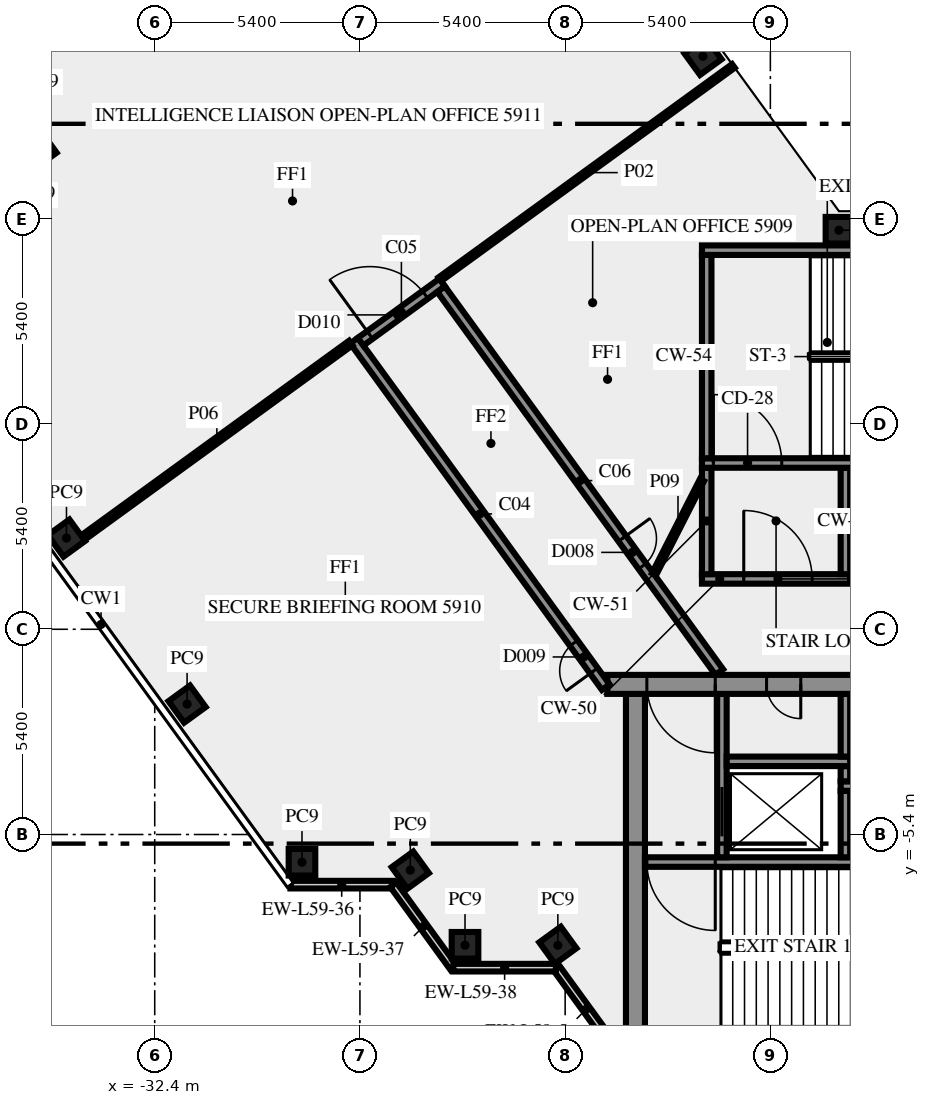
"""IFC4 building model, lengths in metres.
Left out: names, types, materials, properties, quantities, classifications, styles, units other than length and angle.
Written with IfcOpenShell. Run it as: python <this file> out.ifc"""

import sys

from ifc_helpers import new_model, si_unit, direction, frame, frame_2d, origin, origin_2d, place, context, subcontext, project, spatial, rectangle, extrude, element, fill, save


model = new_model("IFC4")
c1 = context("Model", 3, precision=1e-05, world=origin(), true_north=direction((0.0, 1.0)))
c2 = subcontext(c1, "Body", "Model", "MODEL_VIEW")
j1 = project(units=[si_unit("LENGTHUNIT", "METRE"), si_unit("PLANEANGLEUNIT", "RADIAN")], contexts=[c1])
p1 = place(None, origin())
s1 = spatial("IfcSite", under=j1, at=p1, CompositionType="ELEMENT")
p2 = place(p1, origin())
s2 = spatial("IfcBuilding", under=s1, at=p2, CompositionType="ELEMENT")
p3 = place(p2, frame((0.0, 0.0, 253.0)))
s3 = spatial("IfcBuildingStorey", under=s2, at=p3, CompositionType="ELEMENT", Elevation=253.0)
for number, where, z_axis, x_axis in (
    (1, (-17.974, 15.075, 0.0), (0.0, 0.0, 1.0), (-0.588, 0.809, 0.0)),
    (2, (-35.471, 12.616, 0.0), (0.0, 0.0, 1.0), (-0.809, -0.588, 0.0)),
    (3, (-34.722, 2.4, 0.0), (0.0, 0.0, 1.0), (0.588, -0.809, 0.0)),
    (4, (-31.548, -1.969, 0.0), (0.0, 0.0, 1.0), (0.588, -0.809, 0.0)),
    (5, (-28.525, -6.13, 0.0), (0.0, 0.0, 1.0), (1.0, 0.0, 0.0)),
    (6, (-25.674, -6.337, 0.0), (0.0, 0.0, 1.0), (0.588, -0.809, 0.0)),
    (7, (-24.235, -8.315, 0.0), (0.0, 0.0, 1.0), (1.0, 0.0, 0.0)),
    (8, (-21.792, -8.315, 0.0), (0.0, 0.0, 1.0), (0.588, -0.809, 0.0)),
    (9, (-14.395, 10.5, 0.0), (0.0, 0.0, 1.0), (-1.0, 0.0, 0.0)),
):
    element("IfcColumn", number, at=place(p3, frame(where, z_axis=z_axis, x_axis=x_axis)), inside=s3, PredefinedType="COLUMN", context=c2, shape_type="SweptSolid", body=[
        extrude(rectangle(XDim=0.7, YDim=0.7, at=origin_2d()), origin(), (0.0, 0.0, 1.0), 3.65),
    ])
p4 = place(p3, frame((-21.833, -8.909, 0.0), z_axis=(0.0, 0.0, 1.0), x_axis=(0.587766567315, -0.809030569476, 0.0)))
e10 = element("IfcWall", 10, at=p4, inside=s3, PredefinedType="SOLIDWALL", context=c2, shape_type="SweptSolid", body=[
    extrude(rectangle(XDim=2.688, YDim=0.2, at=frame_2d((1.344, 0.0))), origin(), (0.0, 0.0, 1.0), 3.65),
])
p5 = place(p3, frame((-28.83, -6.719, 0.0), z_axis=(0.0, 0.0, 1.0), x_axis=(1.0, 0.0, 0.0)))
e11 = element("IfcWall", 11, at=p5, inside=s3, PredefinedType="SOLIDWALL", context=c2, shape_type="SweptSolid", body=[
    extrude(rectangle(XDim=2.7, YDim=0.2, at=frame_2d((1.35, 0.0))), origin(), (0.0, 0.0, 1.0), 3.65),
])
p6 = place(p3, frame((-26.12, -6.724, 0.0), z_axis=(0.0, 0.0, 1.0), x_axis=(0.587720002413, -0.809064397168, 0.0)))
e12 = element("IfcWall", 12, at=p6, inside=s3, PredefinedType="SOLIDWALL", context=c2, shape_type="SweptSolid", body=[
    extrude(rectangle(XDim=2.7, YDim=0.2, at=frame_2d((1.35, 0.0))), origin(), (0.0, 0.0, 1.0), 3.65),
])
p7 = place(p3, frame((-24.543, -8.904, 0.0), z_axis=(0.0, 0.0, 1.0), x_axis=(1.0, 0.0, 0.0)))
e13 = element("IfcWall", 13, at=p7, inside=s3, PredefinedType="SOLIDWALL", context=c2, shape_type="SweptSolid", body=[
    extrude(rectangle(XDim=2.7, YDim=0.2, at=frame_2d((1.35, 0.0))), origin(), (0.0, 0.0, 1.0), 3.65),
])
p8 = place(p3, frame((-19.75, -10.5, 0.0), z_axis=(0.0, 0.0, 1.0), x_axis=(0.0, 1.0, 0.0)))
e14 = element("IfcWall", 14, at=p8, inside=s3, PredefinedType="SHEAR", context=c2, shape_type="SweptSolid", body=[
    extrude(rectangle(XDim=8.8, YDim=0.5, at=frame_2d((4.4, 0.0))), origin(), (0.0, 0.0, 1.0), 3.65),
])
p9 = place(p3, frame((-11.45, -6.125, 0.0), z_axis=(0.0, 0.0, 1.0), x_axis=(-1.0, 0.0, 0.0)))
e15 = element("IfcWall", 15, at=p9, inside=s3, PredefinedType="SHEAR", context=c2, shape_type="SweptSolid", body=[
    extrude(rectangle(XDim=8.05, YDim=0.25, at=frame_2d((4.025, 0.0))), origin(), (0.0, 0.0, 1.0), 3.65),
])
p10 = place(p9, frame((6.2, 0.0, 0.0)))
e16 = element("IfcOpeningElement", 16, at=p10, cuts=e15, PredefinedType="OPENING", context=c2, shape_type="SweptSolid", body=[
    extrude(rectangle(XDim=1.8, YDim=2.1, at=frame_2d((0.9, 1.05))), frame((0.0, 0.135, 0.0), z_axis=(0.0, -1.0, 0.0), x_axis=(1.0, 0.0, 0.0)), (0.0, 0.0, 1.0), 0.27),
])
p11 = place(p3, frame((-17.475, -6.0, 0.0), z_axis=(0.0, 0.0, 1.0), x_axis=(0.0, 1.0, 0.0)))
e17 = element("IfcWall", 17, at=p11, inside=s3, PredefinedType="SHEAR", context=c2, shape_type="SweptSolid", body=[
    extrude(rectangle(XDim=4.3, YDim=0.25, at=frame_2d((2.15, 0.0))), origin(), (0.0, 0.0, 1.0), 3.65),
])
p12 = place(p11, frame((0.55, 0.0, 0.0)))
e18 = element("IfcOpeningElement", 18, at=p12, cuts=e17, PredefinedType="OPENING", context=c2, shape_type="SweptSolid", body=[
    extrude(rectangle(XDim=1.3, YDim=2.1, at=frame_2d((0.65, 1.05))), frame((0.0, 0.135, 0.0), z_axis=(0.0, -1.0, 0.0), x_axis=(1.0, 0.0, 0.0)), (0.0, 0.0, 1.0), 0.27),
])
p13 = place(p3, frame((-14.225, -6.0, 0.0), z_axis=(0.0, 0.0, 1.0), x_axis=(0.0, 1.0, 0.0)))
e19 = element("IfcWall", 19, at=p13, inside=s3, PredefinedType="SHEAR", context=c2, shape_type="SweptSolid", body=[
    extrude(rectangle(XDim=1.75, YDim=0.25, at=frame_2d((0.875, 0.0))), origin(), (0.0, 0.0, 1.0), 3.65),
])
p14 = place(p3, frame((-14.35, -4.125, 0.0), z_axis=(0.0, 0.0, 1.0), x_axis=(1.0, 0.0, 0.0)))
e20 = element("IfcWall", 20, at=p14, inside=s3, PredefinedType="SHEAR", context=c2, shape_type="SweptSolid", body=[
    extrude(rectangle(XDim=10.4, YDim=0.25, at=frame_2d((5.2, 0.0))), origin(), (0.0, 0.0, 1.0), 3.65),
])
p15 = place(p14, frame((4.75, 0.0, 0.0)))
e21 = element("IfcOpeningElement", 21, at=p15, cuts=e20, PredefinedType="OPENING", context=c2, shape_type="SweptSolid", body=[
    extrude(rectangle(XDim=1.1, YDim=2.1, at=frame_2d((0.55, 1.05))), frame((0.0, 0.135, 0.0), z_axis=(0.0, -1.0, 0.0), x_axis=(1.0, 0.0, 0.0)), (0.0, 0.0, 1.0), 0.27),
])
p16 = place(p14, frame((7.25, 0.0, 0.0)))
e22 = element("IfcOpeningElement", 22, at=p16, cuts=e20, PredefinedType="OPENING", context=c2, shape_type="SweptSolid", body=[
    extrude(rectangle(XDim=1.1, YDim=2.1, at=frame_2d((0.55, 1.05))), frame((0.0, 0.135, 0.0), z_axis=(0.0, -1.0, 0.0), x_axis=(1.0, 0.0, 0.0)), (0.0, 0.0, 1.0), 0.27),
])
p17 = place(p3, frame((-14.225, -4.0, 0.0), z_axis=(0.0, 0.0, 1.0), x_axis=(0.0, 1.0, 0.0)))
e23 = element("IfcWall", 23, at=p17, inside=s3, PredefinedType="SHEAR", context=c2, shape_type="SweptSolid", body=[
    extrude(rectangle(XDim=0.4, YDim=0.25, at=frame_2d((0.2, 0.0))), origin(), (0.0, 0.0, 1.0), 3.65),
])
p18 = place(p3, frame((-17.35, -3.475, 0.0), z_axis=(0.0, 0.0, 1.0), x_axis=(1.0, 0.0, 0.0)))
e24 = element("IfcWall", 24, at=p18, inside=s3, PredefinedType="SHEAR", context=c2, shape_type="SweptSolid", body=[
    extrude(rectangle(XDim=3.25, YDim=0.25, at=frame_2d((1.625, 0.0))), origin(), (0.0, 0.0, 1.0), 3.65),
])
p19 = place(p3, frame((-14.225, -3.35, 0.0), z_axis=(0.0, 0.0, 1.0), x_axis=(0.0, 1.0, 0.0)))
e25 = element("IfcWall", 25, at=p19, inside=s3, PredefinedType="SHEAR", context=c2, shape_type="SweptSolid", body=[
    extrude(rectangle(XDim=1.65, YDim=0.25, at=frame_2d((0.825, 0.0))), origin(), (0.0, 0.0, 1.0), 3.65),
])
p20 = place(p3, frame((20.49, -1.45, 0.0), z_axis=(0.0, 0.0, 1.0), x_axis=(-1.0, 0.0, 0.0)))
e26 = element("IfcWall", 26, at=p20, inside=s3, PredefinedType="SHEAR", context=c2, shape_type="SweptSolid", body=[
    extrude(rectangle(XDim=40.98, YDim=0.5, at=frame_2d((20.49, 0.0))), origin(), (0.0, 0.0, 1.0), 3.65),
])
p21 = place(p20, frame((38.14, 0.0, 0.0)))
e27 = element("IfcOpeningElement", 27, at=p21, cuts=e26, PredefinedType="OPENING", context=c2, shape_type="SweptSolid", body=[
    extrude(rectangle(XDim=1.8, YDim=2.1, at=frame_2d((0.9, 1.05))), frame((0.0, 0.26, 0.0), z_axis=(0.0, -1.0, 0.0), x_axis=(1.0, 0.0, 0.0)), (0.0, 0.0, 1.0), 0.52),
])
p22 = place(p20, frame((35.89, 0.0, 0.0)))
e28 = element("IfcOpeningElement", 28, at=p22, cuts=e26, PredefinedType="OPENING", context=c2, shape_type="SweptSolid", body=[
    extrude(rectangle(XDim=0.9, YDim=2.1, at=frame_2d((0.45, 1.05))), frame((0.0, 0.26, 0.0), z_axis=(0.0, -1.0, 0.0), x_axis=(1.0, 0.0, 0.0)), (0.0, 0.0, 1.0), 0.52),
])
p23 = place(p20, frame((32.94, 0.0, 0.0)))
e29 = element("IfcOpeningElement", 29, at=p23, cuts=e26, PredefinedType="OPENING", context=c2, shape_type="SweptSolid", body=[
    extrude(rectangle(XDim=0.9, YDim=2.1, at=frame_2d((0.45, 1.05))), frame((0.0, 0.26, 0.0), z_axis=(0.0, -1.0, 0.0), x_axis=(1.0, 0.0, 0.0)), (0.0, 0.0, 1.0), 0.52),
])
p24 = place(p20, frame((31.015, 0.0, 0.0)))
e30 = element("IfcOpeningElement", 30, at=p24, cuts=e26, PredefinedType="OPENING", context=c2, shape_type="SweptSolid", body=[
    extrude(rectangle(XDim=0.8, YDim=2.1, at=frame_2d((0.4, 1.05))), frame((0.0, 0.26, 0.0), z_axis=(0.0, -1.0, 0.0), x_axis=(1.0, 0.0, 0.0)), (0.0, 0.0, 1.0), 0.52),
])
p25 = place(p20, frame((24.765, 0.0, 0.0)))
e31 = element("IfcOpeningElement", 31, at=p25, cuts=e26, PredefinedType="OPENING", context=c2, shape_type="SweptSolid", body=[
    extrude(rectangle(XDim=0.8, YDim=2.1, at=frame_2d((0.4, 1.05))), frame((0.0, 0.26, 0.0), z_axis=(0.0, -1.0, 0.0), x_axis=(1.0, 0.0, 0.0)), (0.0, 0.0, 1.0), 0.52),
])
p26 = place(p20, frame((21.765, 0.0, 0.0)))
e32 = element("IfcOpeningElement", 32, at=p26, cuts=e26, PredefinedType="OPENING", context=c2, shape_type="SweptSolid", body=[
    extrude(rectangle(XDim=2.0, YDim=2.1, at=frame_2d((1.0, 1.05))), frame((0.0, 0.26, 0.0), z_axis=(0.0, -1.0, 0.0), x_axis=(1.0, 0.0, 0.0)), (0.0, 0.0, 1.0), 0.52),
])
p27 = place(p20, frame((14.202, 0.0, 0.0)))
e33 = element("IfcOpeningElement", 33, at=p27, cuts=e26, PredefinedType="OPENING", context=c2, shape_type="SweptSolid", body=[
    extrude(rectangle(XDim=0.9, YDim=2.1, at=frame_2d((0.45, 1.05))), frame((0.0, 0.26, 0.0), z_axis=(0.0, -1.0, 0.0), x_axis=(1.0, 0.0, 0.0)), (0.0, 0.0, 1.0), 0.52),
])
p28 = place(p20, frame((10.478, 0.0, 0.0)))
e34 = element("IfcOpeningElement", 34, at=p28, cuts=e26, PredefinedType="OPENING", context=c2, shape_type="SweptSolid", body=[
    extrude(rectangle(XDim=0.9, YDim=2.1, at=frame_2d((0.45, 1.05))), frame((0.0, 0.26, 0.0), z_axis=(0.0, -1.0, 0.0), x_axis=(1.0, 0.0, 0.0)), (0.0, 0.0, 1.0), 0.52),
])
p29 = place(p20, frame((7.14, 0.0, 0.0)))
e35 = element("IfcOpeningElement", 35, at=p29, cuts=e26, PredefinedType="OPENING", context=c2, shape_type="SweptSolid", body=[
    extrude(rectangle(XDim=0.9, YDim=2.1, at=frame_2d((0.45, 1.05))), frame((0.0, 0.26, 0.0), z_axis=(0.0, -1.0, 0.0), x_axis=(1.0, 0.0, 0.0)), (0.0, 0.0, 1.0), 0.52),
])
p30 = place(p20, frame((5.028, 0.0, 0.0)))
e36 = element("IfcOpeningElement", 36, at=p30, cuts=e26, PredefinedType="OPENING", context=c2, shape_type="SweptSolid", body=[
    extrude(rectangle(XDim=0.8, YDim=2.1, at=frame_2d((0.4, 1.05))), frame((0.0, 0.26, 0.0), z_axis=(0.0, -1.0, 0.0), x_axis=(1.0, 0.0, 0.0)), (0.0, 0.0, 1.0), 0.52),
])
p31 = place(p20, frame((3.452, 0.0, 0.0)))
e37 = element("IfcOpeningElement", 37, at=p31, cuts=e26, PredefinedType="OPENING", context=c2, shape_type="SweptSolid", body=[
    extrude(rectangle(XDim=0.8, YDim=2.1, at=frame_2d((0.4, 1.05))), frame((0.0, 0.26, 0.0), z_axis=(0.0, -1.0, 0.0), x_axis=(1.0, 0.0, 0.0)), (0.0, 0.0, 1.0), 0.52),
])
p32 = place(p20, frame((1.04, 0.0, 0.0)))
e38 = element("IfcOpeningElement", 38, at=p32, cuts=e26, PredefinedType="OPENING", context=c2, shape_type="SweptSolid", body=[
    extrude(rectangle(XDim=1.8, YDim=2.1, at=frame_2d((0.9, 1.05))), frame((0.0, 0.26, 0.0), z_axis=(0.0, -1.0, 0.0), x_axis=(1.0, 0.0, 0.0)), (0.0, 0.0, 1.0), 0.52),
])
p33 = place(p3, frame((-18.0, 1.325, 0.0), z_axis=(0.0, 0.0, 1.0), x_axis=(1.0, 0.0, 0.0)))
e39 = element("IfcWall", 39, at=p33, inside=s3, PredefinedType="SHEAR", context=c2, shape_type="SweptSolid", body=[
    extrude(rectangle(XDim=3.9, YDim=0.25, at=frame_2d((1.95, 0.0))), origin(), (0.0, 0.0, 1.0), 3.65),
])
p34 = place(p33, frame((1.1, 0.0, 0.0)))
e40 = element("IfcOpeningElement", 40, at=p34, cuts=e39, PredefinedType="OPENING", context=c2, shape_type="SweptSolid", body=[
    extrude(rectangle(XDim=1.8, YDim=2.1, at=frame_2d((0.9, 1.05))), frame((0.0, 0.135, 0.0), z_axis=(0.0, -1.0, 0.0), x_axis=(1.0, 0.0, 0.0)), (0.0, 0.0, 1.0), 0.27),
])
for number, where, z_axis, x_axis in (
    (41, (-17.875, 1.45, 0.0), (0.0, 0.0, 1.0), (0.0, 1.0, 0.0)),
    (42, (-14.225, 1.45, 0.0), (0.0, 0.0, 1.0), (0.0, 1.0, 0.0)),
):
    element("IfcWall", number, at=place(p3, frame(where, z_axis=z_axis, x_axis=x_axis)), inside=s3, PredefinedType="SHEAR", context=c2, shape_type="SweptSolid", body=[
        extrude(rectangle(XDim=2.8, YDim=0.25, at=frame_2d((1.4, 0.0))), origin(), (0.0, 0.0, 1.0), 3.65),
    ])
p35 = place(p3, frame((-18.0, 4.375, 0.0), z_axis=(0.0, 0.0, 1.0), x_axis=(1.0, 0.0, 0.0)))
e43 = element("IfcWall", 43, at=p35, inside=s3, PredefinedType="SHEAR", context=c2, shape_type="SweptSolid", body=[
    extrude(rectangle(XDim=10.5, YDim=0.25, at=frame_2d((5.25, 0.0))), origin(), (0.0, 0.0, 1.0), 3.65),
])
p36 = place(p35, frame((0.3, 0.0, 0.0)))
e44 = element("IfcOpeningElement", 44, at=p36, cuts=e43, PredefinedType="OPENING", context=c2, shape_type="SweptSolid", body=[
    extrude(rectangle(XDim=1.8, YDim=2.1, at=frame_2d((0.9, 1.05))), frame((0.0, 0.135, 0.0), z_axis=(0.0, -1.0, 0.0), x_axis=(1.0, 0.0, 0.0)), (0.0, 0.0, 1.0), 0.27),
])
p37 = place(p3, frame((-17.875, 4.5, 0.0), z_axis=(0.0, 0.0, 1.0), x_axis=(0.0, 1.0, 0.0)))
e45 = element("IfcWall", 45, at=p37, inside=s3, PredefinedType="SHEAR", context=c2, shape_type="SweptSolid", body=[
    extrude(rectangle(XDim=5.35, YDim=0.25, at=frame_2d((2.675, 0.0))), origin(), (0.0, 0.0, 1.0), 3.65),
])
p38 = place(p3, frame((-18.0, 9.975, 0.0), z_axis=(0.0, 0.0, 1.0), x_axis=(1.0, 0.0, 0.0)))
e46 = element("IfcWall", 46, at=p38, inside=s3, PredefinedType="SHEAR", context=c2, shape_type="SweptSolid", body=[
    extrude(rectangle(XDim=10.5, YDim=0.25, at=frame_2d((5.25, 0.0))), origin(), (0.0, 0.0, 1.0), 3.65),
])
p39 = place(p38, frame((4.5, 0.0, 1.0)))
e47 = element("IfcOpeningElement", 47, at=p39, cuts=e46, PredefinedType="OPENING", context=c2, shape_type="SweptSolid", body=[
    extrude(rectangle(XDim=1.2, YDim=1.2, at=frame_2d((0.6, 0.6))), frame((0.0, 0.135, 0.0), z_axis=(0.0, -1.0, 0.0), x_axis=(1.0, 0.0, 0.0)), (0.0, 0.0, 1.0), 0.27),
])
p40 = place(p3, frame((-20.531, -1.523, 0.0), z_axis=(0.0, 0.0, 1.0), x_axis=(-0.587782646447, 0.809018887626, 0.0)))
e48 = element("IfcWall", 48, at=p40, inside=s3, PredefinedType="SOLIDWALL", context=c2, shape_type="SweptSolid", body=[
    extrude(rectangle(XDim=11.27, YDim=0.25, at=frame_2d((5.635, 0.0))), origin(), (0.0, 0.0, 1.0), 3.65),
])
p41 = place(p40, frame((0.533, 0.0, 0.0)))
e49 = element("IfcOpeningElement", 49, at=p41, cuts=e48, PredefinedType="OPENING", context=c2, shape_type="SweptSolid", body=[
    extrude(rectangle(XDim=0.9, YDim=2.1, at=frame_2d((0.45, 1.05))), frame((0.0, 0.135, 0.0), z_axis=(0.0, -1.0, 0.0), x_axis=(1.0, 0.0, 0.0)), (0.0, 0.0, 1.0), 0.27),
])
p42 = place(p3, frame((-26.981, 7.567, 0.0), z_axis=(0.0, 0.0, 1.0), x_axis=(0.809038743598, 0.587755315891, 0.0)))
e50 = element("IfcWall", 50, at=p42, inside=s3, PredefinedType="SOLIDWALL", context=c2, shape_type="SweptSolid", body=[
    extrude(rectangle(XDim=2.65, YDim=0.25, at=frame_2d((1.325, 0.0))), origin(), (0.0, 0.0, 1.0), 3.65),
])
p43 = place(p42, frame((0.3, 0.0, 0.0)))
e51 = element("IfcOpeningElement", 51, at=p43, cuts=e50, PredefinedType="OPENING", context=c2, shape_type="SweptSolid", body=[
    extrude(rectangle(XDim=1.8, YDim=2.1, at=frame_2d((0.9, 1.05))), frame((0.0, 0.135, 0.0), z_axis=(0.0, -1.0, 0.0), x_axis=(1.0, 0.0, 0.0)), (0.0, 0.0, 1.0), 0.27),
])
p44 = place(p3, frame((-24.865, 8.95, 0.0), z_axis=(0.0, 0.0, 1.0), x_axis=(0.587791617212, -0.809012369952, 0.0)))
e52 = element("IfcWall", 52, at=p44, inside=s3, PredefinedType="SOLIDWALL", context=c2, shape_type="SweptSolid", body=[
    extrude(rectangle(XDim=12.453, YDim=0.25, at=frame_2d((6.227, 0.0))), origin(), (0.0, 0.0, 1.0), 3.65),
])
p45 = place(p44, frame((8.112, 0.0, 0.0)))
e53 = element("IfcOpeningElement", 53, at=p45, cuts=e52, PredefinedType="OPENING", context=c2, shape_type="SweptSolid", body=[
    extrude(rectangle(XDim=0.9, YDim=2.1, at=frame_2d((0.45, 1.05))), frame((0.0, 0.135, 0.0), z_axis=(0.0, -1.0, 0.0), x_axis=(1.0, 0.0, 0.0)), (0.0, 0.0, 1.0), 0.27),
])
p46 = place(p3, frame((-17.172, 14.823, 0.0), z_axis=(0.0, 0.0, 1.0), x_axis=(-0.809013490065, -0.587790075531, 0.0)))
e54 = element("IfcWall", 54, at=p46, inside=s3, PredefinedType="PARTITIONING", context=c2, shape_type="SweptSolid", body=[
    extrude(rectangle(XDim=9.549, YDim=0.12, at=frame_2d((4.775, 0.0))), origin(), (0.0, 0.0, 1.0), 2.95),
])
p47 = place(p3, frame((-34.291, 2.41, 0.0), z_axis=(0.0, 0.0, 1.0), x_axis=(0.809027940177, 0.587770186393, 0.0)))
e55 = element("IfcWall", 55, at=p47, inside=s3, PredefinedType="PARTITIONING", context=c2, shape_type="SweptSolid", body=[
    extrude(rectangle(XDim=8.715, YDim=0.15, at=frame_2d((4.357, 0.0))), origin(), (0.0, 0.0, 1.0), 3.65),
])
p48 = place(p3, frame((-19.261, 1.45, 0.0), z_axis=(0.0, 0.0, 1.0), x_axis=(0.453950796792, 0.891026752736, 0.0)))
e56 = element("IfcWall", 56, at=p48, inside=s3, PredefinedType="PARTITIONING", context=c2, shape_type="SweptSolid", body=[
    extrude(rectangle(XDim=2.778, YDim=0.12, at=frame_2d((1.389, 0.0))), origin(), (0.0, 0.0, 1.0), 3.65),
])
p49 = place(p10, origin())
e57 = element("IfcDoor", 57, at=p49, inside=s3, OperationType="DOUBLE_DOOR_SINGLE_SWING", PredefinedType="DOOR", context=c2, shape_type="SweptSolid", body=[
    extrude(rectangle(XDim=1.8, YDim=2.1, at=frame_2d((0.9, 1.05))), frame((0.0, 0.025, 0.0), z_axis=(0.0, -1.0, 0.0), x_axis=(1.0, 0.0, 0.0)), (0.0, 0.0, 1.0), 0.05),
])
fill(e16, e57)
p50 = place(p12, origin())
e58 = element("IfcDoor", 58, at=p50, inside=s3, OperationType="DOUBLE_DOOR_SLIDING", PredefinedType="DOOR", context=c2, shape_type="SweptSolid", body=[
    extrude(rectangle(XDim=1.3, YDim=2.1, at=frame_2d((0.65, 1.05))), frame((0.0, 0.025, 0.0), z_axis=(0.0, -1.0, 0.0), x_axis=(1.0, 0.0, 0.0)), (0.0, 0.0, 1.0), 0.05),
])
fill(e18, e58)
p51 = place(p21, origin())
e59 = element("IfcDoor", 59, at=p51, inside=s3, OperationType="DOUBLE_DOOR_SINGLE_SWING", PredefinedType="DOOR", context=c2, shape_type="SweptSolid", body=[
    extrude(rectangle(XDim=1.8, YDim=2.1, at=frame_2d((0.9, 1.05))), frame((0.0, 0.025, 0.0), z_axis=(0.0, -1.0, 0.0), x_axis=(1.0, 0.0, 0.0)), (0.0, 0.0, 1.0), 0.05),
])
fill(e27, e59)
p52 = place(p22, origin())
e60 = element("IfcDoor", 60, at=p52, inside=s3, OperationType="SINGLE_SWING_RIGHT", PredefinedType="DOOR", context=c2, shape_type="SweptSolid", body=[
    extrude(rectangle(XDim=0.9, YDim=2.1, at=frame_2d((0.45, 1.05))), frame((0.0, 0.025, 0.0), z_axis=(0.0, -1.0, 0.0), x_axis=(1.0, 0.0, 0.0)), (0.0, 0.0, 1.0), 0.05),
])
fill(e28, e60)
p53 = place(p34, origin())
e61 = element("IfcDoor", 61, at=p53, inside=s3, OperationType="DOUBLE_DOOR_SINGLE_SWING", PredefinedType="DOOR", context=c2, shape_type="SweptSolid", body=[
    extrude(rectangle(XDim=1.8, YDim=2.1, at=frame_2d((0.9, 1.05))), frame((0.0, 0.025, 0.0), z_axis=(0.0, -1.0, 0.0), x_axis=(1.0, 0.0, 0.0)), (0.0, 0.0, 1.0), 0.05),
])
fill(e40, e61)
p54 = place(p36, origin())
e62 = element("IfcDoor", 62, at=p54, inside=s3, OperationType="DOUBLE_DOOR_SINGLE_SWING", PredefinedType="DOOR", context=c2, shape_type="SweptSolid", body=[
    extrude(rectangle(XDim=1.8, YDim=2.1, at=frame_2d((0.9, 1.05))), frame((0.0, 0.025, 0.0), z_axis=(0.0, -1.0, 0.0), x_axis=(1.0, 0.0, 0.0)), (0.0, 0.0, 1.0), 0.05),
])
fill(e44, e62)
p55 = place(p45, origin())
e63 = element("IfcDoor", 63, at=p55, inside=s3, OperationType="SINGLE_SWING_RIGHT", PredefinedType="DOOR", context=c2, shape_type="SweptSolid", body=[
    extrude(rectangle(XDim=0.9, YDim=2.1, at=frame_2d((0.45, 1.05))), frame((0.0, 0.025, 0.0), z_axis=(0.0, -1.0, 0.0), x_axis=(1.0, 0.0, 0.0)), (0.0, 0.0, 1.0), 0.05),
])
fill(e53, e63)
p56 = place(p43, origin())
e64 = element("IfcDoor", 64, at=p56, inside=s3, OperationType="DOUBLE_DOOR_SINGLE_SWING", PredefinedType="DOOR", context=c2, shape_type="SweptSolid", body=[
    extrude(rectangle(XDim=1.8, YDim=2.1, at=frame_2d((0.9, 1.05))), frame((0.0, 0.025, 0.0), z_axis=(0.0, -1.0, 0.0), x_axis=(1.0, 0.0, 0.0)), (0.0, 0.0, 1.0), 0.05),
])
fill(e51, e64)
p57 = place(p41, origin())
e65 = element("IfcDoor", 65, at=p57, inside=s3, OperationType="SINGLE_SWING_LEFT", PredefinedType="DOOR", context=c2, shape_type="SweptSolid", body=[
    extrude(rectangle(XDim=0.9, YDim=2.1, at=frame_2d((0.45, 1.05))), frame((0.0, 0.025, 0.0), z_axis=(0.0, -1.0, 0.0), x_axis=(1.0, 0.0, 0.0)), (0.0, 0.0, 1.0), 0.05),
])
fill(e49, e65)
save(model, sys.argv[1])
